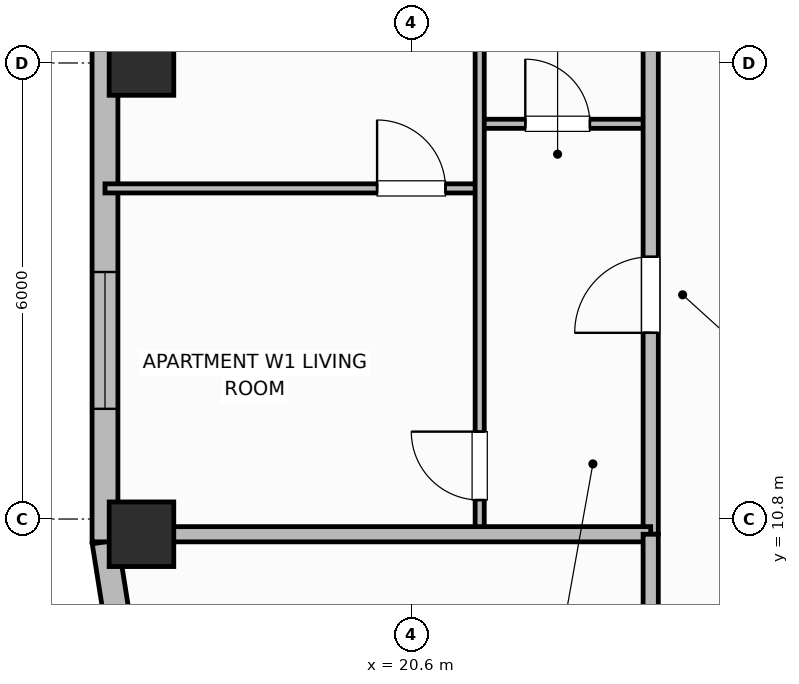
"""IFC4 building model, lengths in metres.
Left out: names, types, materials, properties, quantities, classifications, styles, units other than length and angle.
Written with IfcOpenShell. Run it as: python <this file> out.ifc"""

import sys

from ifc_helpers import new_model, si_unit, direction, frame, frame_2d, origin, origin_2d, place, context, subcontext, project, spatial, rectangle, extrude, element, fill, save


model = new_model("IFC4")
c1 = context("Model", 3, precision=1e-05, world=origin(), true_north=direction((0.0, 1.0)))
c2 = subcontext(c1, "Body", "Model", "MODEL_VIEW")
j1 = project(units=[si_unit("LENGTHUNIT", "METRE"), si_unit("PLANEANGLEUNIT", "RADIAN")], contexts=[c1])
p1 = place(None, origin())
s1 = spatial("IfcSite", under=j1, at=p1, CompositionType="ELEMENT")
p2 = place(p1, origin())
s2 = spatial("IfcBuilding", under=s1, at=p2, CompositionType="ELEMENT")
p3 = place(p2, frame((0.0, 0.0, 203.1)))
s3 = spatial("IfcBuildingStorey", under=s2, at=p3, CompositionType="ELEMENT", Elevation=203.1)
for number, where, z_axis, x_axis in (
    (1, (17.05, 10.6, 0.0), (0.0, 0.0, 1.0), (1.0, 0.0, 0.0)),
    (2, (17.05, 16.8, 0.0), (0.0, 0.0, 1.0), (1.0, 0.0, 0.0)),
):
    element("IfcColumn", number, at=place(p3, frame(where, z_axis=z_axis, x_axis=x_axis)), inside=s3, PredefinedType="COLUMN", context=c2, shape_type="SweptSolid", body=[
        extrude(rectangle(XDim=0.85, YDim=0.85, at=origin_2d()), origin(), (0.0, 0.0, 1.0), 4.2),
    ])
p4 = place(p3, frame((16.57, 10.5, 0.0), z_axis=(0.0, 0.0, 1.0), x_axis=(0.156514556949, -0.987675651954, 0.0)))
e3 = element("IfcWall", 3, at=p4, inside=s3, PredefinedType="SOLIDWALL", context=c2, shape_type="SweptSolid", body=[
    extrude(rectangle(XDim=1.135, YDim=0.34, at=frame_2d((0.568, 0.0))), origin(), (0.0, 0.0, 1.0), 3.22),
])
p5 = place(p3, frame((16.57, 23.8, 0.0), z_axis=(0.0, 0.0, 1.0), x_axis=(0.0, -1.0, 0.0)))
e4 = element("IfcWall", 4, at=p5, inside=s3, PredefinedType="SOLIDWALL", context=c2, shape_type="SweptSolid", body=[
    extrude(rectangle(XDim=13.3, YDim=0.34, at=frame_2d((6.65, 0.0))), origin(), (0.0, 0.0, 1.0), 3.22),
])
p6 = place(p5, frame((1.7, 0.0, 0.0)))
e5 = element("IfcOpeningElement", 5, at=p6, cuts=e4, PredefinedType="OPENING", context=c2, shape_type="SweptSolid", body=[
    extrude(rectangle(XDim=1.6, YDim=2.1, at=frame_2d((0.8, 1.05))), frame((0.0, 0.18, 0.0), z_axis=(0.0, -1.0, 0.0), x_axis=(1.0, 0.0, 0.0)), (0.0, 0.0, 1.0), 0.36),
])
p7 = place(p5, frame((9.75, 0.0, 0.85)))
e6 = element("IfcOpeningElement", 6, at=p7, cuts=e4, PredefinedType="OPENING", context=c2, shape_type="SweptSolid", body=[
    extrude(rectangle(XDim=1.8, YDim=1.85, at=frame_2d((0.9, 0.925))), frame((0.0, 0.18, 0.0), z_axis=(0.0, -1.0, 0.0), x_axis=(1.0, 0.0, 0.0)), (0.0, 0.0, 1.0), 0.36),
])
p8 = place(p3, frame((21.5, 16.0, 0.0), z_axis=(0.0, 0.0, 1.0), x_axis=(1.0, 0.0, 0.0)))
e7 = element("IfcWall", 7, at=p8, inside=s3, PredefinedType="PARTITIONING", context=c2, shape_type="SweptSolid", body=[
    extrude(rectangle(XDim=2.25, YDim=0.12, at=frame_2d((1.125, 0.0))), origin(), (0.0, 0.0, 1.0), 3.05),
])
p9 = place(p8, frame((0.6, 0.0, 0.0)))
e8 = element("IfcOpeningElement", 8, at=p9, cuts=e7, PredefinedType="OPENING", context=c2, shape_type="SweptSolid", body=[
    extrude(rectangle(XDim=0.85, YDim=2.1, at=frame_2d((0.425, 1.05))), frame((0.0, 0.07, 0.0), z_axis=(0.0, -1.0, 0.0), x_axis=(1.0, 0.0, 0.0)), (0.0, 0.0, 1.0), 0.14),
])
p10 = place(p3, frame((16.57, 15.15, 0.0), z_axis=(0.0, 0.0, 1.0), x_axis=(1.0, 0.0, 0.0)))
e9 = element("IfcWall", 9, at=p10, inside=s3, PredefinedType="PARTITIONING", context=c2, shape_type="SweptSolid", body=[
    extrude(rectangle(XDim=4.93, YDim=0.12, at=frame_2d((2.465, 0.0))), origin(), (0.0, 0.0, 1.0), 3.05),
])
p11 = place(p10, frame((3.58, 0.0, 0.0)))
e10 = element("IfcOpeningElement", 10, at=p11, cuts=e9, PredefinedType="OPENING", context=c2, shape_type="SweptSolid", body=[
    extrude(rectangle(XDim=0.9, YDim=2.1, at=frame_2d((0.45, 1.05))), frame((0.0, 0.07, 0.0), z_axis=(0.0, -1.0, 0.0), x_axis=(1.0, 0.0, 0.0)), (0.0, 0.0, 1.0), 0.14),
])
p12 = place(p3, frame((21.5, 10.64, 0.0), z_axis=(0.0, 0.0, 1.0), x_axis=(0.0, 1.0, 0.0)))
e11 = element("IfcWall", 11, at=p12, inside=s3, PredefinedType="PARTITIONING", context=c2, shape_type="SweptSolid", body=[
    extrude(rectangle(XDim=15.92, YDim=0.12, at=frame_2d((7.96, 0.0))), origin(), (0.0, 0.0, 1.0), 3.05),
])
p13 = place(p12, frame((0.41, 0.0, 0.0)))
e12 = element("IfcOpeningElement", 12, at=p13, cuts=e11, PredefinedType="OPENING", context=c2, shape_type="SweptSolid", body=[
    extrude(rectangle(XDim=0.9, YDim=2.1, at=frame_2d((0.45, 1.05))), frame((0.0, 0.07, 0.0), z_axis=(0.0, -1.0, 0.0), x_axis=(1.0, 0.0, 0.0)), (0.0, 0.0, 1.0), 0.14),
])
p14 = place(p12, frame((13.125, 0.0, 0.0)))
e13 = element("IfcOpeningElement", 13, at=p14, cuts=e11, PredefinedType="OPENING", context=c2, shape_type="SweptSolid", body=[
    extrude(rectangle(XDim=0.82, YDim=2.08, at=frame_2d((0.41, 1.04))), frame((0.0, 0.07, 0.0), z_axis=(0.0, -1.0, 0.0), x_axis=(1.0, 0.0, 0.0)), (0.0, 0.0, 1.0), 0.14),
])
p15 = place(p3, frame((23.75, 10.6, 0.0), z_axis=(0.0, 0.0, 1.0), x_axis=(0.0, 1.0, 0.0)))
e14 = element("IfcWall", 14, at=p15, inside=s3, PredefinedType="PARTITIONING", context=c2, shape_type="SweptSolid", body=[
    extrude(rectangle(XDim=35.2, YDim=0.2, at=frame_2d((17.6, 0.0))), origin(), (0.0, 0.0, 1.0), 3.05),
])
p16 = place(p15, frame((2.65, 0.0, 0.0)))
e15 = element("IfcOpeningElement", 15, at=p16, cuts=e14, PredefinedType="OPENING", context=c2, shape_type="SweptSolid", body=[
    extrude(rectangle(XDim=1.0, YDim=2.15, at=frame_2d((0.5, 1.075))), frame((0.0, 0.11, 0.0), z_axis=(0.0, -1.0, 0.0), x_axis=(1.0, 0.0, 0.0)), (0.0, 0.0, 1.0), 0.22),
])
p17 = place(p15, frame((19.95, 0.0, 0.0)))
e16 = element("IfcOpeningElement", 16, at=p17, cuts=e14, PredefinedType="OPENING", context=c2, shape_type="SweptSolid", body=[
    extrude(rectangle(XDim=1.0, YDim=2.15, at=frame_2d((0.5, 1.075))), frame((0.0, 0.11, 0.0), z_axis=(0.0, -1.0, 0.0), x_axis=(1.0, 0.0, 0.0)), (0.0, 0.0, 1.0), 0.22),
])
p18 = place(p3, frame((16.99, 10.6, 0.0), z_axis=(0.0, 0.0, 1.0), x_axis=(1.0, 0.0, 0.0)))
e17 = element("IfcWall", 17, at=p18, inside=s3, PredefinedType="PARTITIONING", context=c2, shape_type="SweptSolid", body=[
    extrude(rectangle(XDim=6.76, YDim=0.2, at=frame_2d((3.38, 0.0))), origin(), (0.0, 0.0, 1.0), 3.05),
])
p19 = place(p3, frame((23.75, 6.87, 0.0), z_axis=(0.0, 0.0, 1.0), x_axis=(0.0, 1.0, 0.0)))
e18 = element("IfcWall", 18, at=p19, inside=s3, PredefinedType="PARTITIONING", context=c2, shape_type="SweptSolid", body=[
    extrude(rectangle(XDim=3.73, YDim=0.2, at=frame_2d((1.865, 0.0))), origin(), (0.0, 0.0, 1.0), 3.05),
])
p20 = place(p7, origin())
e19 = element("IfcWindow", 19, at=p20, inside=s3, PartitioningType="SINGLE_PANEL", PredefinedType="WINDOW", context=c2, shape_type="SweptSolid", body=[
    extrude(rectangle(XDim=1.8, YDim=1.85, at=frame_2d((0.9, 0.925))), frame((0.0, 0.03, 0.0), z_axis=(0.0, -1.0, 0.0), x_axis=(1.0, 0.0, 0.0)), (0.0, 0.0, 1.0), 0.06),
])
fill(e6, e19)
p21 = place(p9, origin())
e20 = element("IfcDoor", 20, at=p21, inside=s3, OperationType="SINGLE_SWING_LEFT", PredefinedType="DOOR", context=c2, shape_type="SweptSolid", body=[
    extrude(rectangle(XDim=0.85, YDim=2.1, at=frame_2d((0.425, 1.05))), frame((0.0, 0.025, 0.0), z_axis=(0.0, -1.0, 0.0), x_axis=(1.0, 0.0, 0.0)), (0.0, 0.0, 1.0), 0.05),
])
fill(e8, e20)
p22 = place(p11, origin())
e21 = element("IfcDoor", 21, at=p22, inside=s3, OperationType="SINGLE_SWING_LEFT", PredefinedType="DOOR", context=c2, shape_type="SweptSolid", body=[
    extrude(rectangle(XDim=0.9, YDim=2.1, at=frame_2d((0.45, 1.05))), frame((0.0, 0.025, 0.0), z_axis=(0.0, -1.0, 0.0), x_axis=(1.0, 0.0, 0.0)), (0.0, 0.0, 1.0), 0.05),
])
fill(e10, e21)
p23 = place(p13, origin())
e22 = element("IfcDoor", 22, at=p23, inside=s3, OperationType="SINGLE_SWING_RIGHT", PredefinedType="DOOR", context=c2, shape_type="SweptSolid", body=[
    extrude(rectangle(XDim=0.9, YDim=2.1, at=frame_2d((0.45, 1.05))), frame((0.0, 0.025, 0.0), z_axis=(0.0, -1.0, 0.0), x_axis=(1.0, 0.0, 0.0)), (0.0, 0.0, 1.0), 0.05),
])
fill(e12, e22)
p24 = place(p16, origin())
e23 = element("IfcDoor", 23, at=p24, inside=s3, OperationType="SINGLE_SWING_LEFT", PredefinedType="DOOR", context=c2, shape_type="SweptSolid", body=[
    extrude(rectangle(XDim=1.0, YDim=2.15, at=frame_2d((0.5, 1.075))), frame((0.0, 0.025, 0.0), z_axis=(0.0, -1.0, 0.0), x_axis=(1.0, 0.0, 0.0)), (0.0, 0.0, 1.0), 0.05),
])
fill(e15, e23)
save(model, sys.argv[1])
